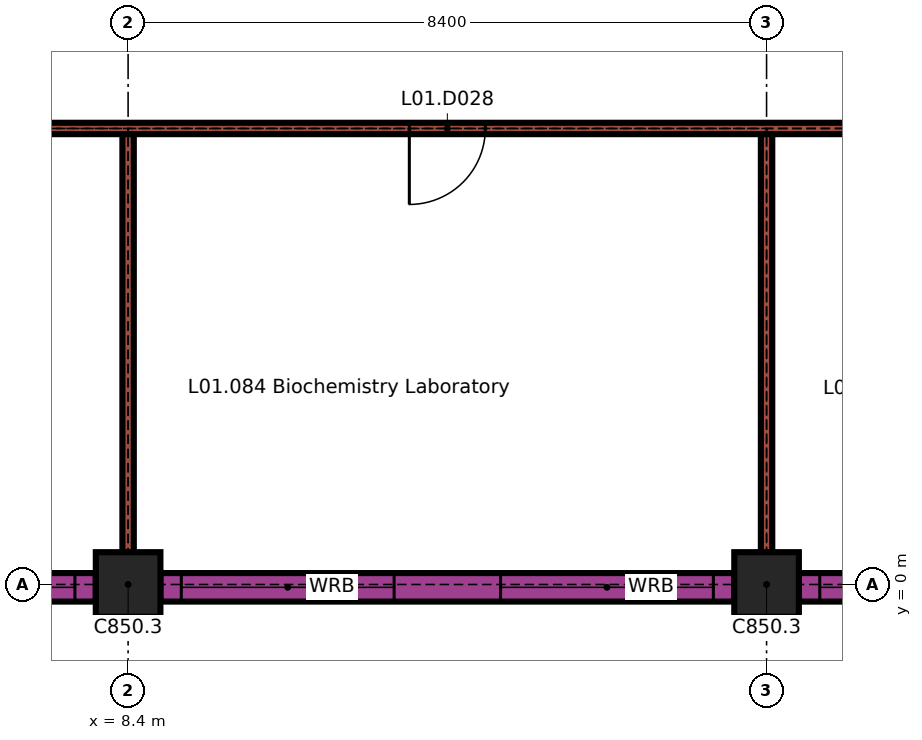
"""IFC4 building model, lengths in metres.
Left out: names, types, materials, properties, quantities, classifications, styles, units other than length and angle.
Written with IfcOpenShell. Run it as: python <this file> out.ifc"""

import sys

from ifc_helpers import new_model, si_unit, direction, frame, frame_2d, origin, origin_2d, place, context, subcontext, project, spatial, rectangle, extrude, element, fill, save


model = new_model("IFC4")
c1 = context("Model", 3, precision=1e-05, world=origin(), true_north=direction((0.0, 1.0)))
c2 = subcontext(c1, "Body", "Model", "MODEL_VIEW")
j1 = project(units=[si_unit("LENGTHUNIT", "METRE"), si_unit("PLANEANGLEUNIT", "RADIAN")], contexts=[c1])
p1 = place(None, origin())
s1 = spatial("IfcSite", under=j1, at=p1, CompositionType="ELEMENT")
p2 = place(p1, origin())
s2 = spatial("IfcBuilding", under=s1, at=p2, CompositionType="ELEMENT")
p3 = place(p2, frame((0.0, 0.0, 4.5)))
s3 = spatial("IfcBuildingStorey", under=s2, at=p3, CompositionType="ELEMENT", Elevation=4.5)
for number, where, z_axis, x_axis in (
    (1, (8.4, 0.0, 0.0), (0.0, 0.0, 1.0), (1.0, 0.0, 0.0)),
    (2, (16.8, 0.0, 0.0), (0.0, 0.0, 1.0), (1.0, 0.0, 0.0)),
):
    element("IfcColumn", number, at=place(p3, frame(where, z_axis=z_axis, x_axis=x_axis)), inside=s3, PredefinedType="COLUMN", context=c2, shape_type="SweptSolid", body=[
        extrude(rectangle(XDim=0.85, YDim=0.85, at=origin_2d()), origin(), (0.0, 0.0, 1.0), 3.45),
    ])
p4 = place(p3, frame((0.425, -0.038, 0.0), z_axis=(0.0, 0.0, 1.0), x_axis=(1.0, 0.0, 0.0)))
e3 = element("IfcWall", 3, at=p4, inside=s3, PredefinedType="SOLIDWALL", context=c2, shape_type="SweptSolid", body=[
    extrude(rectangle(XDim=7.55, YDim=0.375, at=frame_2d((3.775, 0.0))), origin(), (0.0, 0.0, 1.0), 3.15),
])
p5 = place(p4, frame((0.275, 0.0, 1.0)))
e4 = element("IfcOpeningElement", 4, at=p5, cuts=e3, PredefinedType="OPENING", context=c2, shape_type="SweptSolid", body=[
    extrude(rectangle(XDim=2.8, YDim=1.2, at=frame_2d((1.4, 0.6))), frame((0.0, 0.198, 0.0), z_axis=(0.0, -1.0, 0.0), x_axis=(1.0, 0.0, 0.0)), (0.0, 0.0, 1.0), 0.395),
])
p6 = place(p4, frame((4.475, 0.0, 1.0)))
e5 = element("IfcOpeningElement", 5, at=p6, cuts=e3, PredefinedType="OPENING", context=c2, shape_type="SweptSolid", body=[
    extrude(rectangle(XDim=2.8, YDim=1.2, at=frame_2d((1.4, 0.6))), frame((0.0, 0.198, 0.0), z_axis=(0.0, -1.0, 0.0), x_axis=(1.0, 0.0, 0.0)), (0.0, 0.0, 1.0), 0.395),
])
p7 = place(p3, frame((8.825, -0.038, 0.0), z_axis=(0.0, 0.0, 1.0), x_axis=(1.0, 0.0, 0.0)))
e6 = element("IfcWall", 6, at=p7, inside=s3, PredefinedType="SOLIDWALL", context=c2, shape_type="SweptSolid", body=[
    extrude(rectangle(XDim=7.55, YDim=0.375, at=frame_2d((3.775, 0.0))), origin(), (0.0, 0.0, 1.0), 3.15),
])
p8 = place(p7, frame((0.275, 0.0, 1.0)))
e7 = element("IfcOpeningElement", 7, at=p8, cuts=e6, PredefinedType="OPENING", context=c2, shape_type="SweptSolid", body=[
    extrude(rectangle(XDim=2.8, YDim=1.2, at=frame_2d((1.4, 0.6))), frame((0.0, 0.198, 0.0), z_axis=(0.0, -1.0, 0.0), x_axis=(1.0, 0.0, 0.0)), (0.0, 0.0, 1.0), 0.395),
])
p9 = place(p7, frame((4.475, 0.0, 1.0)))
e8 = element("IfcOpeningElement", 8, at=p9, cuts=e6, PredefinedType="OPENING", context=c2, shape_type="SweptSolid", body=[
    extrude(rectangle(XDim=2.8, YDim=1.2, at=frame_2d((1.4, 0.6))), frame((0.0, 0.198, 0.0), z_axis=(0.0, -1.0, 0.0), x_axis=(1.0, 0.0, 0.0)), (0.0, 0.0, 1.0), 0.395),
])
p10 = place(p3, frame((17.225, -0.038, 0.0), z_axis=(0.0, 0.0, 1.0), x_axis=(1.0, 0.0, 0.0)))
e9 = element("IfcWall", 9, at=p10, inside=s3, PredefinedType="SOLIDWALL", context=c2, shape_type="SweptSolid", body=[
    extrude(rectangle(XDim=5.375, YDim=0.375, at=frame_2d((2.688, 0.0))), origin(), (0.0, 0.0, 1.0), 3.15),
])
p11 = place(p10, frame((0.275, 0.0, 1.0)))
e10 = element("IfcOpeningElement", 10, at=p11, cuts=e9, PredefinedType="OPENING", context=c2, shape_type="SweptSolid", body=[
    extrude(rectangle(XDim=2.8, YDim=1.2, at=frame_2d((1.4, 0.6))), frame((0.0, 0.198, 0.0), z_axis=(0.0, -1.0, 0.0), x_axis=(1.0, 0.0, 0.0)), (0.0, 0.0, 1.0), 0.395),
])
p12 = place(p3, frame((0.15, 6.0, 0.0), z_axis=(0.0, 0.0, 1.0), x_axis=(1.0, 0.0, 0.0)))
e11 = element("IfcWall", 11, at=p12, inside=s3, PredefinedType="PARTITIONING", context=c2, shape_type="SweptSolid", body=[
    extrude(rectangle(XDim=24.925, YDim=0.15, at=frame_2d((12.462, 0.0))), origin(), (0.0, 0.0, 1.0), 3.45),
])
p13 = place(p12, frame((3.625, 0.0, 0.0)))
e12 = element("IfcOpeningElement", 12, at=p13, cuts=e11, PredefinedType="OPENING", context=c2, shape_type="SweptSolid", body=[
    extrude(rectangle(XDim=1.0, YDim=2.1, at=frame_2d((0.5, 1.05))), frame((0.0, 0.085, 0.0), z_axis=(0.0, -1.0, 0.0), x_axis=(1.0, 0.0, 0.0)), (0.0, 0.0, 1.0), 0.17),
])
p14 = place(p12, frame((11.95, 0.0, 0.0)))
e13 = element("IfcOpeningElement", 13, at=p14, cuts=e11, PredefinedType="OPENING", context=c2, shape_type="SweptSolid", body=[
    extrude(rectangle(XDim=1.0, YDim=2.1, at=frame_2d((0.5, 1.05))), frame((0.0, 0.085, 0.0), z_axis=(0.0, -1.0, 0.0), x_axis=(1.0, 0.0, 0.0)), (0.0, 0.0, 1.0), 0.17),
])
p15 = place(p12, frame((19.05, 0.0, 0.0)))
e14 = element("IfcOpeningElement", 14, at=p15, cuts=e11, PredefinedType="OPENING", context=c2, shape_type="SweptSolid", body=[
    extrude(rectangle(XDim=1.0, YDim=2.1, at=frame_2d((0.5, 1.05))), frame((0.0, 0.085, 0.0), z_axis=(0.0, -1.0, 0.0), x_axis=(1.0, 0.0, 0.0)), (0.0, 0.0, 1.0), 0.17),
])
p16 = place(p12, frame((23.188, 0.0, 0.0)))
e15 = element("IfcOpeningElement", 15, at=p16, cuts=e11, PredefinedType="OPENING", context=c2, shape_type="SweptSolid", body=[
    extrude(rectangle(XDim=1.0, YDim=2.1, at=frame_2d((0.5, 1.05))), frame((0.0, 0.085, 0.0), z_axis=(0.0, -1.0, 0.0), x_axis=(1.0, 0.0, 0.0)), (0.0, 0.0, 1.0), 0.17),
])
for number, where, z_axis, x_axis in (
    (16, (8.4, 0.425, 0.0), (0.0, 0.0, 1.0), (0.0, 1.0, 0.0)),
    (17, (16.8, 0.425, 0.0), (0.0, 0.0, 1.0), (0.0, 1.0, 0.0)),
):
    element("IfcWall", number, at=place(p3, frame(where, z_axis=z_axis, x_axis=x_axis)), inside=s3, PredefinedType="PARTITIONING", context=c2, shape_type="SweptSolid", body=[
        extrude(rectangle(XDim=5.5, YDim=0.15, at=frame_2d((2.75, 0.0))), origin(), (0.0, 0.0, 1.0), 3.45),
    ])
p17 = place(p6, origin())
e18 = element("IfcWindow", 18, at=p17, inside=s3, PartitioningType="DOUBLE_PANEL_VERTICAL", PredefinedType="WINDOW", context=c2, shape_type="SweptSolid", body=[
    extrude(rectangle(XDim=2.8, YDim=1.2, at=frame_2d((1.4, 0.6))), frame((0.0, 0.03, 0.0), z_axis=(0.0, -1.0, 0.0), x_axis=(1.0, 0.0, 0.0)), (0.0, 0.0, 1.0), 0.06),
])
fill(e5, e18)
p18 = place(p8, origin())
e19 = element("IfcWindow", 19, at=p18, inside=s3, PartitioningType="DOUBLE_PANEL_VERTICAL", PredefinedType="WINDOW", context=c2, shape_type="SweptSolid", body=[
    extrude(rectangle(XDim=2.8, YDim=1.2, at=frame_2d((1.4, 0.6))), frame((0.0, 0.03, 0.0), z_axis=(0.0, -1.0, 0.0), x_axis=(1.0, 0.0, 0.0)), (0.0, 0.0, 1.0), 0.06),
])
fill(e7, e19)
p19 = place(p9, origin())
e20 = element("IfcWindow", 20, at=p19, inside=s3, PartitioningType="DOUBLE_PANEL_VERTICAL", PredefinedType="WINDOW", context=c2, shape_type="SweptSolid", body=[
    extrude(rectangle(XDim=2.8, YDim=1.2, at=frame_2d((1.4, 0.6))), frame((0.0, 0.03, 0.0), z_axis=(0.0, -1.0, 0.0), x_axis=(1.0, 0.0, 0.0)), (0.0, 0.0, 1.0), 0.06),
])
fill(e8, e20)
p20 = place(p11, origin())
e21 = element("IfcWindow", 21, at=p20, inside=s3, PartitioningType="DOUBLE_PANEL_VERTICAL", PredefinedType="WINDOW", context=c2, shape_type="SweptSolid", body=[
    extrude(rectangle(XDim=2.8, YDim=1.2, at=frame_2d((1.4, 0.6))), frame((0.0, 0.03, 0.0), z_axis=(0.0, -1.0, 0.0), x_axis=(1.0, 0.0, 0.0)), (0.0, 0.0, 1.0), 0.06),
])
fill(e10, e21)
p21 = place(p14, origin())
e22 = element("IfcDoor", 22, at=p21, inside=s3, OperationType="SINGLE_SWING_LEFT", PredefinedType="DOOR", context=c2, shape_type="SweptSolid", body=[
    extrude(rectangle(XDim=1.0, YDim=2.1, at=frame_2d((0.5, 1.05))), frame((0.0, 0.025, 0.0), z_axis=(0.0, -1.0, 0.0), x_axis=(1.0, 0.0, 0.0)), (0.0, 0.0, 1.0), 0.05),
])
fill(e13, e22)
save(model, sys.argv[1])
